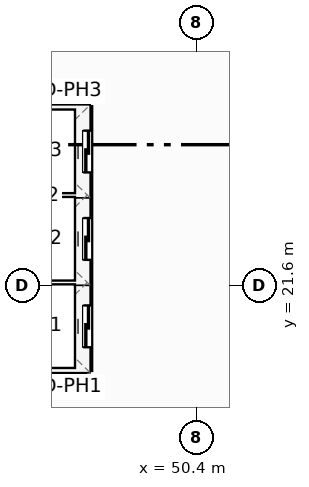
"""IFC4 building model, lengths in metres.
Left out: names, types, materials, properties, quantities, classifications, styles, units other than length and angle.
Written with IfcOpenShell. Run it as: python <this file> out.ifc"""

import sys

from ifc_helpers import new_model, si_unit, direction, frame, frame_2d, origin, place, context, subcontext, project, spatial, rectangle, extrude, element, fill, save


model = new_model("IFC4")
c1 = context("Model", 3, precision=1e-05, world=origin(), true_north=direction((0.0, 1.0)))
c2 = subcontext(c1, "Body", "Model", "MODEL_VIEW")
j1 = project(units=[si_unit("LENGTHUNIT", "METRE"), si_unit("PLANEANGLEUNIT", "RADIAN")], contexts=[c1])
p1 = place(None, origin())
s1 = spatial("IfcSite", under=j1, at=p1, CompositionType="ELEMENT")
p2 = place(p1, origin())
s2 = spatial("IfcBuilding", under=s1, at=p2, CompositionType="ELEMENT")
p3 = place(p2, frame((0.0, 0.0, 273.0)))
s3 = spatial("IfcBuildingStorey", under=s2, at=p3, CompositionType="ELEMENT", Elevation=273.0)
for number, where, z_axis, x_axis in (
    (1, (45.24, 21.675, 0.0), (0.0, 0.0, 1.0), (1.0, 0.0, 0.0)),
    (2, (45.24, 23.975, 0.0), (0.0, 0.0, 1.0), (1.0, 0.0, 0.0)),
):
    element("IfcWall", number, at=place(p3, frame(where, z_axis=z_axis, x_axis=x_axis)), inside=s3, PredefinedType="PARTITIONING", context=c2, shape_type="SweptSolid", body=[
        extrude(rectangle(XDim=2.22, YDim=0.2, at=frame_2d((1.11, 0.0))), origin(), (0.0, 0.0, 1.0), 3.45),
    ])
p4 = place(p3, frame((45.24, 19.38, 0.0), z_axis=(0.0, 0.0, 1.0), x_axis=(1.0, 0.0, 0.0)))
e3 = element("IfcWall", 3, at=p4, inside=s3, PredefinedType="PARTITIONING", context=c2, shape_type="SweptSolid", body=[
    extrude(rectangle(XDim=2.22, YDim=0.2, at=frame_2d((1.11, 0.0))), origin(), (0.0, 0.0, 1.0), 2.662),
])
p5 = place(p3, frame((45.24, 26.28, 0.0), z_axis=(0.0, 0.0, 1.0), x_axis=(1.0, 0.0, 0.0)))
e4 = element("IfcWall", 4, at=p5, inside=s3, PredefinedType="PARTITIONING", context=c2, shape_type="SweptSolid", body=[
    extrude(rectangle(XDim=2.22, YDim=0.2, at=frame_2d((1.11, 0.0))), origin(), (0.0, 0.0, 1.0), 3.45),
])
p6 = place(p3, frame((47.52, 19.38, 0.0), z_axis=(0.0, 0.0, 1.0), x_axis=(0.0, 1.0, 0.0)))
e5 = element("IfcWall", 5, at=p6, inside=s3, PredefinedType="PARTITIONING", context=c2, shape_type="SweptSolid", body=[
    extrude(rectangle(XDim=6.9, YDim=0.2, at=frame_2d((3.45, 0.0))), origin(), (0.0, 0.0, 1.0), 3.45),
])
p7 = place(p6, frame((0.59, 0.0, 0.0)))
e6 = element("IfcOpeningElement", 6, at=p7, cuts=e5, PredefinedType="OPENING", context=c2, shape_type="SweptSolid", body=[
    extrude(rectangle(XDim=1.1, YDim=2.15, at=frame_2d((0.55, 1.075))), frame((0.0, 0.11, 0.0), z_axis=(0.0, -1.0, 0.0), x_axis=(1.0, 0.0, 0.0)), (0.0, 0.0, 1.0), 0.22),
])
p8 = place(p6, frame((2.89, 0.0, 0.0)))
e7 = element("IfcOpeningElement", 7, at=p8, cuts=e5, PredefinedType="OPENING", context=c2, shape_type="SweptSolid", body=[
    extrude(rectangle(XDim=1.1, YDim=2.15, at=frame_2d((0.55, 1.075))), frame((0.0, 0.11, 0.0), z_axis=(0.0, -1.0, 0.0), x_axis=(1.0, 0.0, 0.0)), (0.0, 0.0, 1.0), 0.22),
])
p9 = place(p6, frame((5.19, 0.0, 0.0)))
e8 = element("IfcOpeningElement", 8, at=p9, cuts=e5, PredefinedType="OPENING", context=c2, shape_type="SweptSolid", body=[
    extrude(rectangle(XDim=1.1, YDim=2.15, at=frame_2d((0.55, 1.075))), frame((0.0, 0.11, 0.0), z_axis=(0.0, -1.0, 0.0), x_axis=(1.0, 0.0, 0.0)), (0.0, 0.0, 1.0), 0.22),
])
p10 = place(p7, origin())
e9 = element("IfcDoor", 9, at=p10, inside=s3, OperationType="SLIDING_TO_LEFT", PredefinedType="DOOR", context=c2, shape_type="SweptSolid", body=[
    extrude(rectangle(XDim=1.1, YDim=2.15, at=frame_2d((0.55, 1.075))), frame((0.0, 0.025, 0.0), z_axis=(0.0, -1.0, 0.0), x_axis=(1.0, 0.0, 0.0)), (0.0, 0.0, 1.0), 0.05),
])
fill(e6, e9)
p11 = place(p8, origin())
e10 = element("IfcDoor", 10, at=p11, inside=s3, OperationType="SLIDING_TO_LEFT", PredefinedType="DOOR", context=c2, shape_type="SweptSolid", body=[
    extrude(rectangle(XDim=1.1, YDim=2.15, at=frame_2d((0.55, 1.075))), frame((0.0, 0.025, 0.0), z_axis=(0.0, -1.0, 0.0), x_axis=(1.0, 0.0, 0.0)), (0.0, 0.0, 1.0), 0.05),
])
fill(e7, e10)
p12 = place(p9, origin())
e11 = element("IfcDoor", 11, at=p12, inside=s3, OperationType="SLIDING_TO_LEFT", PredefinedType="DOOR", context=c2, shape_type="SweptSolid", body=[
    extrude(rectangle(XDim=1.1, YDim=2.15, at=frame_2d((0.55, 1.075))), frame((0.0, 0.025, 0.0), z_axis=(0.0, -1.0, 0.0), x_axis=(1.0, 0.0, 0.0)), (0.0, 0.0, 1.0), 0.05),
])
fill(e8, e11)
save(model, sys.argv[1])
